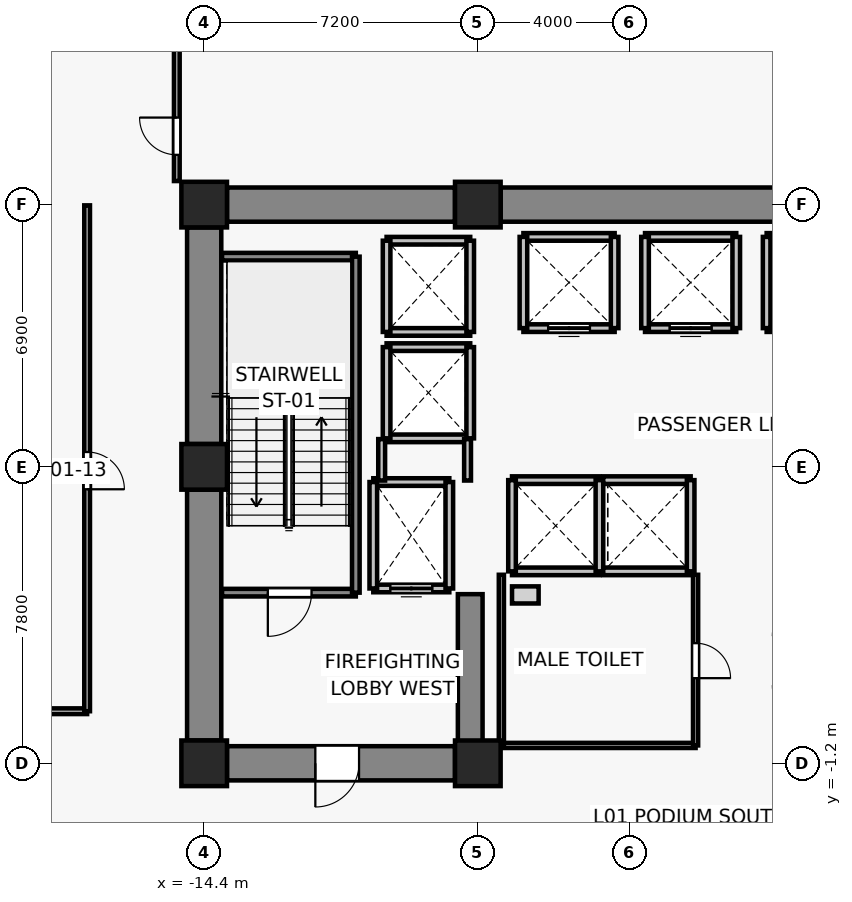
"""IFC4 building model, lengths in metres.
Left out: names, types, materials, properties, quantities, classifications, styles, units other than length and angle.
Written with IfcOpenShell. Run it as: python <this file> out.ifc"""

import sys

from ifc_helpers import new_model, si_unit, direction, frame, frame_2d, origin, origin_2d, place, context, subcontext, project, spatial, rectangle, extrude, source, transform, mapped, element, fill, save


model = new_model("IFC4")
c1 = context("Model", 3, precision=1e-05, world=origin(), true_north=direction((0.0, 1.0)))
c2 = subcontext(c1, "Body", "Model", "MODEL_VIEW")
j1 = project(units=[si_unit("LENGTHUNIT", "METRE"), si_unit("PLANEANGLEUNIT", "RADIAN")], contexts=[c1])
p1 = place(None, origin())
s1 = spatial("IfcSite", under=j1, at=p1, CompositionType="ELEMENT")
p2 = place(p1, origin())
s2 = spatial("IfcBuilding", under=s1, at=p2, CompositionType="ELEMENT")
p3 = place(p2, frame((0.0, 0.0, 5.0)))
s3 = spatial("IfcBuildingStorey", under=s2, at=p3, CompositionType="ELEMENT", Elevation=5.0)
for number, where, z_axis, x_axis in (
    (1, (-14.4, -1.2, 0.0), (0.0, 0.0, 1.0), (1.0, 0.0, 0.0)),
    (2, (-7.2, -1.2, 0.0), (0.0, 0.0, 1.0), (1.0, 0.0, 0.0)),
    (3, (-14.4, 6.6, 0.0), (0.0, 0.0, 1.0), (1.0, 0.0, 0.0)),
    (4, (-14.4, 13.5, 0.0), (0.0, 0.0, 1.0), (1.0, 0.0, 0.0)),
    (5, (-7.2, 13.5, 0.0), (0.0, 0.0, 1.0), (1.0, 0.0, 0.0)),
):
    element("IfcColumn", number, at=place(p3, frame(where, z_axis=z_axis, x_axis=x_axis)), inside=s3, PredefinedType="COLUMN", context=c2, shape_type="SweptSolid", body=[
        extrude(rectangle(XDim=1.2, YDim=1.2, at=origin_2d()), origin(), (0.0, 0.0, 1.0), 4.4),
    ])
p4 = place(p3, frame((-13.8, 13.5, 0.0), z_axis=(0.0, 0.0, 1.0), x_axis=(1.0, 0.0, 0.0)))
e6 = element("IfcWall", 6, at=p4, inside=s3, PredefinedType="SHEAR", context=c2, shape_type="SweptSolid", body=[
    extrude(rectangle(XDim=6.0, YDim=0.9, at=frame_2d((3.0, 0.0))), origin(), (0.0, 0.0, 1.0), 4.1),
])
p5 = place(p3, frame((-6.6, 13.5, 0.0), z_axis=(0.0, 0.0, 1.0), x_axis=(1.0, 0.0, 0.0)))
e7 = element("IfcWall", 7, at=p5, inside=s3, PredefinedType="SHEAR", context=c2, shape_type="SweptSolid", body=[
    extrude(rectangle(XDim=13.2, YDim=0.9, at=frame_2d((6.6, 0.0))), origin(), (0.0, 0.0, 1.0), 4.1),
])
p6 = place(p3, frame((-14.4, -0.6, 0.0), z_axis=(0.0, 0.0, 1.0), x_axis=(0.0, 1.0, 0.0)))
e8 = element("IfcWall", 8, at=p6, inside=s3, PredefinedType="SHEAR", context=c2, shape_type="SweptSolid", body=[
    extrude(rectangle(XDim=6.6, YDim=0.9, at=frame_2d((3.3, 0.0))), origin(), (0.0, 0.0, 1.0), 4.1),
])
p7 = place(p3, frame((-14.4, 7.2, 0.0), z_axis=(0.0, 0.0, 1.0), x_axis=(0.0, 1.0, 0.0)))
e9 = element("IfcWall", 9, at=p7, inside=s3, PredefinedType="SHEAR", context=c2, shape_type="SweptSolid", body=[
    extrude(rectangle(XDim=5.7, YDim=0.9, at=frame_2d((2.85, 0.0))), origin(), (0.0, 0.0, 1.0), 4.1),
])
p8 = place(p3, frame((-7.8, -1.2, 0.0), z_axis=(0.0, 0.0, 1.0), x_axis=(-1.0, 0.0, 0.0)))
e10 = element("IfcWall", 10, at=p8, inside=s3, PredefinedType="SHEAR", context=c2, shape_type="SweptSolid", body=[
    extrude(rectangle(XDim=6.0, YDim=0.9, at=frame_2d((3.0, 0.0))), origin(), (0.0, 0.0, 1.0), 4.1),
])
p9 = place(p8, frame((2.525, 0.0, 0.0)))
e11 = element("IfcOpeningElement", 11, at=p9, cuts=e10, PredefinedType="OPENING", context=c2, shape_type="SweptSolid", body=[
    extrude(rectangle(XDim=1.15, YDim=2.15, at=frame_2d((0.575, 1.075))), frame((0.0, 0.46, 0.0), z_axis=(0.0, -1.0, 0.0), x_axis=(1.0, 0.0, 0.0)), (0.0, 0.0, 1.0), 0.92),
])
p10 = place(p3, frame((-7.4, -0.75, 0.0), z_axis=(0.0, 0.0, 1.0), x_axis=(0.0, 1.0, 0.0)))
e12 = element("IfcWall", 12, at=p10, inside=s3, PredefinedType="SHEAR", context=c2, shape_type="SweptSolid", body=[
    extrude(rectangle(XDim=4.0, YDim=0.65, at=frame_2d((2.0, 0.0))), origin(), (0.0, 0.0, 1.0), 4.1),
])
p11 = place(p3, frame((-7.95, 3.4, 0.0), z_axis=(0.0, 0.0, 1.0), x_axis=(-1.0, 0.0, 0.0)))
e13 = element("IfcWall", 13, at=p11, inside=s3, PredefinedType="SOLIDWALL", context=c2, shape_type="SweptSolid", body=[
    extrude(rectangle(XDim=2.0, YDim=0.2, at=frame_2d((1.0, 0.0))), origin(), (0.0, 0.0, 1.0), 4.1),
])
p12 = place(p11, frame((0.45, 0.0, 0.0)))
e14 = element("IfcOpeningElement", 14, at=p12, cuts=e13, PredefinedType="OPENING", context=c2, shape_type="SweptSolid", body=[
    extrude(rectangle(XDim=1.1, YDim=2.2, at=frame_2d((0.55, 1.1))), frame((0.0, 0.11, 0.0), z_axis=(0.0, -1.0, 0.0), x_axis=(1.0, 0.0, 0.0)), (0.0, 0.0, 1.0), 0.22),
])
p13 = place(p3, frame((-9.95, 6.2, 0.0), z_axis=(0.0, 0.0, 1.0), x_axis=(1.0, 0.0, 0.0)))
e15 = element("IfcWall", 15, at=p13, inside=s3, PredefinedType="SOLIDWALL", context=c2, shape_type="SweptSolid", body=[
    extrude(rectangle(XDim=2.0, YDim=0.2, at=frame_2d((1.0, 0.0))), origin(), (0.0, 0.0, 1.0), 4.1),
])
for number, where, z_axis, x_axis in (
    (16, (-9.95, 3.4, 0.0), (0.0, 0.0, 1.0), (0.0, 1.0, 0.0)),
    (17, (-7.95, 6.2, 0.0), (0.0, 0.0, 1.0), (0.0, -1.0, 0.0)),
):
    element("IfcWall", number, at=place(p3, frame(where, z_axis=z_axis, x_axis=x_axis)), inside=s3, PredefinedType="SOLIDWALL", context=c2, shape_type="SweptSolid", body=[
        extrude(rectangle(XDim=2.8, YDim=0.2, at=frame_2d((1.4, 0.0))), origin(), (0.0, 0.0, 1.0), 4.1),
    ])
p14 = place(p3, frame((-3.6, 10.25, 0.0), z_axis=(0.0, 0.0, 1.0), x_axis=(-1.0, 0.0, 0.0)))
e18 = element("IfcWall", 18, at=p14, inside=s3, PredefinedType="SOLIDWALL", context=c2, shape_type="SweptSolid", body=[
    extrude(rectangle(XDim=2.4, YDim=0.2, at=frame_2d((1.2, 0.0))), origin(), (0.0, 0.0, 1.0), 4.1),
])
p15 = place(p14, frame((0.65, 0.0, 0.0)))
e19 = element("IfcOpeningElement", 19, at=p15, cuts=e18, PredefinedType="OPENING", context=c2, shape_type="SweptSolid", body=[
    extrude(rectangle(XDim=1.1, YDim=2.2, at=frame_2d((0.55, 1.1))), frame((0.0, 0.11, 0.0), z_axis=(0.0, -1.0, 0.0), x_axis=(1.0, 0.0, 0.0)), (0.0, 0.0, 1.0), 0.22),
])
for number, where, z_axis, x_axis in (
    (20, (-6.0, 12.65, 0.0), (0.0, 0.0, 1.0), (1.0, 0.0, 0.0)),
    (21, (-6.0, 10.25, 0.0), (0.0, 0.0, 1.0), (0.0, 1.0, 0.0)),
    (22, (-3.6, 12.65, 0.0), (0.0, 0.0, 1.0), (0.0, -1.0, 0.0)),
):
    element("IfcWall", number, at=place(p3, frame(where, z_axis=z_axis, x_axis=x_axis)), inside=s3, PredefinedType="SOLIDWALL", context=c2, shape_type="SweptSolid", body=[
        extrude(rectangle(XDim=2.4, YDim=0.2, at=frame_2d((1.2, 0.0))), origin(), (0.0, 0.0, 1.0), 4.1),
    ])
p16 = place(p3, frame((-0.4, 10.25, 0.0), z_axis=(0.0, 0.0, 1.0), x_axis=(-1.0, 0.0, 0.0)))
e23 = element("IfcWall", 23, at=p16, inside=s3, PredefinedType="SOLIDWALL", context=c2, shape_type="SweptSolid", body=[
    extrude(rectangle(XDim=2.4, YDim=0.2, at=frame_2d((1.2, 0.0))), origin(), (0.0, 0.0, 1.0), 4.1),
])
p17 = place(p16, frame((0.65, 0.0, 0.0)))
e24 = element("IfcOpeningElement", 24, at=p17, cuts=e23, PredefinedType="OPENING", context=c2, shape_type="SweptSolid", body=[
    extrude(rectangle(XDim=1.1, YDim=2.2, at=frame_2d((0.55, 1.1))), frame((0.0, 0.11, 0.0), z_axis=(0.0, -1.0, 0.0), x_axis=(1.0, 0.0, 0.0)), (0.0, 0.0, 1.0), 0.22),
])
p18 = place(p3, frame((-2.8, 12.65, 0.0), z_axis=(0.0, 0.0, 1.0), x_axis=(1.0, 0.0, 0.0)))
e25 = element("IfcWall", 25, at=p18, inside=s3, PredefinedType="SOLIDWALL", context=c2, shape_type="SweptSolid", body=[
    extrude(rectangle(XDim=2.4, YDim=0.2, at=frame_2d((1.2, 0.0))), origin(), (0.0, 0.0, 1.0), 4.1),
])
for number, where, z_axis, x_axis in (
    (26, (-2.8, 10.25, 0.0), (0.0, 0.0, 1.0), (0.0, 1.0, 0.0)),
    (27, (-0.4, 12.65, 0.0), (0.0, 0.0, 1.0), (0.0, -1.0, 0.0)),
):
    element("IfcWall", number, at=place(p3, frame(where, z_axis=z_axis, x_axis=x_axis)), inside=s3, PredefinedType="SOLIDWALL", context=c2, shape_type="SweptSolid", body=[
        extrude(rectangle(XDim=2.4, YDim=0.2, at=frame_2d((1.2, 0.0))), origin(), (0.0, 0.0, 1.0), 4.1),
    ])
p19 = place(p3, frame((2.8, 10.25, 0.0), z_axis=(0.0, 0.0, 1.0), x_axis=(-1.0, 0.0, 0.0)))
e28 = element("IfcWall", 28, at=p19, inside=s3, PredefinedType="SOLIDWALL", context=c2, shape_type="SweptSolid", body=[
    extrude(rectangle(XDim=2.4, YDim=0.2, at=frame_2d((1.2, 0.0))), origin(), (0.0, 0.0, 1.0), 4.1),
])
p20 = place(p19, frame((0.65, 0.0, 0.0)))
e29 = element("IfcOpeningElement", 29, at=p20, cuts=e28, PredefinedType="OPENING", context=c2, shape_type="SweptSolid", body=[
    extrude(rectangle(XDim=1.1, YDim=2.2, at=frame_2d((0.55, 1.1))), frame((0.0, 0.11, 0.0), z_axis=(0.0, -1.0, 0.0), x_axis=(1.0, 0.0, 0.0)), (0.0, 0.0, 1.0), 0.22),
])
p21 = place(p3, frame((0.4, 12.65, 0.0), z_axis=(0.0, 0.0, 1.0), x_axis=(1.0, 0.0, 0.0)))
e30 = element("IfcWall", 30, at=p21, inside=s3, PredefinedType="SOLIDWALL", context=c2, shape_type="SweptSolid", body=[
    extrude(rectangle(XDim=2.4, YDim=0.2, at=frame_2d((1.2, 0.0))), origin(), (0.0, 0.0, 1.0), 4.1),
])
p22 = place(p3, frame((0.4, 10.25, 0.0), z_axis=(0.0, 0.0, 1.0), x_axis=(0.0, 1.0, 0.0)))
e31 = element("IfcWall", 31, at=p22, inside=s3, PredefinedType="SOLIDWALL", context=c2, shape_type="SweptSolid", body=[
    extrude(rectangle(XDim=2.4, YDim=0.2, at=frame_2d((1.2, 0.0))), origin(), (0.0, 0.0, 1.0), 4.1),
])
for number, where, z_axis, x_axis in (
    (32, (-4.0, 3.85, 0.0), (0.0, 0.0, 1.0), (-1.0, 0.0, 0.0)),
    (33, (-6.3, 6.25, 0.0), (0.0, 0.0, 1.0), (1.0, 0.0, 0.0)),
):
    element("IfcWall", number, at=place(p3, frame(where, z_axis=z_axis, x_axis=x_axis)), inside=s3, PredefinedType="SOLIDWALL", context=c2, shape_type="SweptSolid", body=[
        extrude(rectangle(XDim=2.3, YDim=0.2, at=frame_2d((1.15, 0.0))), origin(), (0.0, 0.0, 1.0), 4.1),
    ])
for number, where, z_axis, x_axis in (
    (34, (-6.3, 3.85, 0.0), (0.0, 0.0, 1.0), (0.0, 1.0, 0.0)),
    (35, (-4.0, 6.25, 0.0), (0.0, 0.0, 1.0), (0.0, -1.0, 0.0)),
):
    element("IfcWall", number, at=place(p3, frame(where, z_axis=z_axis, x_axis=x_axis)), inside=s3, PredefinedType="SOLIDWALL", context=c2, shape_type="SweptSolid", body=[
        extrude(rectangle(XDim=2.4, YDim=0.2, at=frame_2d((1.2, 0.0))), origin(), (0.0, 0.0, 1.0), 4.1),
    ])
for number, where, z_axis, x_axis in (
    (36, (-1.6, 3.85, 0.0), (0.0, 0.0, 1.0), (-1.0, 0.0, 0.0)),
    (37, (-3.9, 6.25, 0.0), (0.0, 0.0, 1.0), (1.0, 0.0, 0.0)),
):
    element("IfcWall", number, at=place(p3, frame(where, z_axis=z_axis, x_axis=x_axis)), inside=s3, PredefinedType="SOLIDWALL", context=c2, shape_type="SweptSolid", body=[
        extrude(rectangle(XDim=2.3, YDim=0.2, at=frame_2d((1.15, 0.0))), origin(), (0.0, 0.0, 1.0), 4.1),
    ])
p23 = place(p3, frame((-1.6, 6.25, 0.0), z_axis=(0.0, 0.0, 1.0), x_axis=(0.0, -1.0, 0.0)))
e38 = element("IfcWall", 38, at=p23, inside=s3, PredefinedType="SOLIDWALL", context=c2, shape_type="SweptSolid", body=[
    extrude(rectangle(XDim=2.4, YDim=0.2, at=frame_2d((1.2, 0.0))), origin(), (0.0, 0.0, 1.0), 4.1),
])
for number, where, z_axis, x_axis in (
    (39, (-7.4, 7.35, 0.0), (0.0, 0.0, 1.0), (-1.0, 0.0, 0.0)),
    (40, (-9.6, 9.75, 0.0), (0.0, 0.0, 1.0), (1.0, 0.0, 0.0)),
):
    element("IfcWall", number, at=place(p3, frame(where, z_axis=z_axis, x_axis=x_axis)), inside=s3, PredefinedType="SOLIDWALL", context=c2, shape_type="SweptSolid", body=[
        extrude(rectangle(XDim=2.2, YDim=0.2, at=frame_2d((1.1, 0.0))), origin(), (0.0, 0.0, 1.0), 3.19),
    ])
p24 = place(p3, frame((-9.6, 7.35, 0.0), z_axis=(0.0, 0.0, 1.0), x_axis=(0.0, 1.0, 0.0)))
e41 = element("IfcWall", 41, at=p24, inside=s3, PredefinedType="SOLIDWALL", context=c2, shape_type="SweptSolid", body=[
    extrude(rectangle(XDim=2.4, YDim=0.2, at=frame_2d((1.2, 0.0))), origin(), (0.0, 0.0, 1.0), 4.1),
])
p25 = place(p3, frame((-7.4, 9.75, 0.0), z_axis=(0.0, 0.0, 1.0), x_axis=(0.0, -1.0, 0.0)))
e42 = element("IfcWall", 42, at=p25, inside=s3, PredefinedType="SOLIDWALL", context=c2, shape_type="SweptSolid", body=[
    extrude(rectangle(XDim=2.4, YDim=0.2, at=frame_2d((1.2, 0.0))), origin(), (0.0, 0.0, 1.0), 3.19),
])
for number, where, z_axis, x_axis in (
    (43, (-7.4, 10.15, 0.0), (0.0, 0.0, 1.0), (-1.0, 0.0, 0.0)),
    (44, (-9.6, 12.55, 0.0), (0.0, 0.0, 1.0), (1.0, 0.0, 0.0)),
):
    element("IfcWall", number, at=place(p3, frame(where, z_axis=z_axis, x_axis=x_axis)), inside=s3, PredefinedType="SOLIDWALL", context=c2, shape_type="SweptSolid", body=[
        extrude(rectangle(XDim=2.2, YDim=0.2, at=frame_2d((1.1, 0.0))), origin(), (0.0, 0.0, 1.0), 3.19),
    ])
p26 = place(p3, frame((-9.6, 10.15, 0.0), z_axis=(0.0, 0.0, 1.0), x_axis=(0.0, 1.0, 0.0)))
e45 = element("IfcWall", 45, at=p26, inside=s3, PredefinedType="SOLIDWALL", context=c2, shape_type="SweptSolid", body=[
    extrude(rectangle(XDim=2.4, YDim=0.2, at=frame_2d((1.2, 0.0))), origin(), (0.0, 0.0, 1.0), 4.1),
])
p27 = place(p3, frame((-7.4, 12.55, 0.0), z_axis=(0.0, 0.0, 1.0), x_axis=(0.0, -1.0, 0.0)))
e46 = element("IfcWall", 46, at=p27, inside=s3, PredefinedType="SOLIDWALL", context=c2, shape_type="SweptSolid", body=[
    extrude(rectangle(XDim=2.4, YDim=0.2, at=frame_2d((1.2, 0.0))), origin(), (0.0, 0.0, 1.0), 3.19),
])
p28 = place(p3, frame((-10.41, 3.29, 0.0), z_axis=(0.0, 0.0, 1.0), x_axis=(-1.0, 0.0, 0.0)))
e47 = element("IfcWall", 47, at=p28, inside=s3, PredefinedType="SOLIDWALL", context=c2, shape_type="SweptSolid", body=[
    extrude(rectangle(XDim=3.52, YDim=0.2, at=frame_2d((1.76, 0.0))), origin(), (0.0, 0.0, 1.0), 4.1),
])
p29 = place(p28, frame((1.165, 0.0, 0.0)))
e48 = element("IfcOpeningElement", 48, at=p29, cuts=e47, PredefinedType="OPENING", context=c2, shape_type="SweptSolid", body=[
    extrude(rectangle(XDim=1.15, YDim=2.15, at=frame_2d((0.575, 1.075))), frame((0.0, 0.11, 0.0), z_axis=(0.0, -1.0, 0.0), x_axis=(1.0, 0.0, 0.0)), (0.0, 0.0, 1.0), 0.22),
])
p30 = place(p3, frame((-13.93, 12.13, 0.0), z_axis=(0.0, 0.0, 1.0), x_axis=(1.0, 0.0, 0.0)))
e49 = element("IfcWall", 49, at=p30, inside=s3, PredefinedType="SOLIDWALL", context=c2, shape_type="SweptSolid", body=[
    extrude(rectangle(XDim=3.52, YDim=0.2, at=frame_2d((1.76, 0.0))), origin(), (0.0, 0.0, 1.0), 4.1),
])
p31 = place(p3, frame((-10.41, 12.13, 0.0), z_axis=(0.0, 0.0, 1.0), x_axis=(0.0, -1.0, 0.0)))
e50 = element("IfcWall", 50, at=p31, inside=s3, PredefinedType="SOLIDWALL", context=c2, shape_type="SweptSolid", body=[
    extrude(rectangle(XDim=8.84, YDim=0.2, at=frame_2d((4.42, 0.0))), origin(), (0.0, 0.0, 1.0), 4.1),
])
p32 = place(p3, frame((-9.73, 6.24, 0.0), z_axis=(0.0, 0.0, 1.0), x_axis=(0.0, 1.0, 0.0)))
e51 = element("IfcWall", 51, at=p32, inside=s3, PredefinedType="PARTITIONING", context=c2, shape_type="SweptSolid", body=[
    extrude(rectangle(XDim=1.09, YDim=0.18, at=frame_2d((0.545, 0.0))), origin(), (0.0, 0.0, 1.0), 4.1),
])
p33 = place(p3, frame((-7.47, 7.33, 0.0), z_axis=(0.0, 0.0, 1.0), x_axis=(0.0, -1.0, 0.0)))
e52 = element("IfcWall", 52, at=p33, inside=s3, PredefinedType="PARTITIONING", context=c2, shape_type="SweptSolid", body=[
    extrude(rectangle(XDim=1.09, YDim=0.18, at=frame_2d((0.545, 0.0))), origin(), (0.0, 0.0, 1.0), 3.19),
])
p34 = place(p3, frame((-1.47, -0.73, 0.0), z_axis=(0.0, 0.0, 1.0), x_axis=(-1.0, 0.0, 0.0)))
e53 = element("IfcWall", 53, at=p34, inside=s3, PredefinedType="PARTITIONING", context=c2, shape_type="SweptSolid", body=[
    extrude(rectangle(XDim=5.11, YDim=0.135, at=frame_2d((2.555, 0.0))), origin(), (0.0, 0.0, 1.0), 4.1),
])
p35 = place(p3, frame((-6.58, -0.73, 0.0), z_axis=(0.0, 0.0, 1.0), x_axis=(0.0, 1.0, 0.0)))
e54 = element("IfcWall", 54, at=p35, inside=s3, PredefinedType="PARTITIONING", context=c2, shape_type="SweptSolid", body=[
    extrude(rectangle(XDim=4.49, YDim=0.135, at=frame_2d((2.245, 0.0))), origin(), (0.0, 0.0, 1.0), 3.473),
])
p36 = place(p3, frame((-1.47, 3.76, 0.0), z_axis=(0.0, 0.0, 1.0), x_axis=(0.0, -1.0, 0.0)))
e55 = element("IfcWall", 55, at=p36, inside=s3, PredefinedType="PARTITIONING", context=c2, shape_type="SweptSolid", body=[
    extrude(rectangle(XDim=4.49, YDim=0.135, at=frame_2d((2.245, 0.0))), origin(), (0.0, 0.0, 1.0), 3.473),
])
p37 = place(p36, frame((1.8, 0.0, 0.0)))
e56 = element("IfcOpeningElement", 56, at=p37, cuts=e55, PredefinedType="OPENING", context=c2, shape_type="SweptSolid", body=[
    extrude(rectangle(XDim=0.92, YDim=2.1, at=frame_2d((0.46, 1.05))), frame((0.0, 0.077, 0.0), z_axis=(0.0, -1.0, 0.0), x_axis=(1.0, 0.0, 0.0)), (0.0, 0.0, 1.0), 0.155),
])
p38 = place(p3, frame((-17.48, 0.17, 0.0), z_axis=(0.0, 0.0, 1.0), x_axis=(-1.0, 0.0, 0.0)))
e57 = element("IfcWall", 57, at=p38, inside=s3, PredefinedType="PARTITIONING", context=c2, shape_type="SweptSolid", body=[
    extrude(rectangle(XDim=7.31, YDim=0.15, at=frame_2d((3.655, 0.0))), origin(), (0.0, 0.0, 1.0), 3.19),
])
p39 = place(p3, frame((-17.48, 13.48, 0.0), z_axis=(0.0, 0.0, 1.0), x_axis=(0.0, -1.0, 0.0)))
e58 = element("IfcWall", 58, at=p39, inside=s3, PredefinedType="PARTITIONING", context=c2, shape_type="SweptSolid", body=[
    extrude(rectangle(XDim=13.31, YDim=0.15, at=frame_2d((6.655, 0.0))), origin(), (0.0, 0.0, 1.0), 3.19),
])
p40 = place(p39, frame((6.49, 0.0, 0.0)))
e59 = element("IfcOpeningElement", 59, at=p40, cuts=e58, PredefinedType="OPENING", context=c2, shape_type="SweptSolid", body=[
    extrude(rectangle(XDim=0.98, YDim=2.15, at=frame_2d((0.49, 1.075))), frame((0.0, 0.085, 0.0), z_axis=(0.0, -1.0, 0.0), x_axis=(1.0, 0.0, 0.0)), (0.0, 0.0, 1.0), 0.17),
])
p41 = place(p3, frame((-15.12, 14.12, 0.0), z_axis=(0.0, 0.0, 1.0), x_axis=(0.0, 1.0, 0.0)))
e60 = element("IfcWall", 60, at=p41, inside=s3, PredefinedType="PARTITIONING", context=c2, shape_type="SweptSolid", body=[
    extrude(rectangle(XDim=8.76, YDim=0.15, at=frame_2d((4.38, 0.0))), origin(), (0.0, 0.0, 1.0), 3.19),
])
p42 = place(p41, frame((0.69, 0.0, 0.0)))
e61 = element("IfcOpeningElement", 61, at=p42, cuts=e60, PredefinedType="OPENING", context=c2, shape_type="SweptSolid", body=[
    extrude(rectangle(XDim=0.98, YDim=2.15, at=frame_2d((0.49, 1.075))), frame((0.0, 0.085, 0.0), z_axis=(0.0, -1.0, 0.0), x_axis=(1.0, 0.0, 0.0)), (0.0, 0.0, 1.0), 0.17),
])
m1 = source(origin(), c2, "Body", "SweptSolid", [
    extrude(rectangle(XDim=1.1, YDim=2.2, at=frame_2d((0.55, 1.1))), frame((0.0, 0.025, 0.0), z_axis=(0.0, -1.0, 0.0), x_axis=(1.0, 0.0, 0.0)), (0.0, 0.0, 1.0), 0.05),
])
p43 = place(p12, origin())
e62 = element("IfcDoor", 62, at=p43, inside=s3, OperationType="DOUBLE_DOOR_SLIDING", PredefinedType="DOOR", context=c2, shape_type="MappedRepresentation", body=[
    mapped(m1, transform((0.0, 0.0, 0.0), x_axis=(1.0, 0.0, 0.0), y_axis=(0.0, 1.0, 0.0), z_axis=(0.0, 0.0, 1.0), scale=1.0)),
])
fill(e14, e62)
p44 = place(p15, origin())
e63 = element("IfcDoor", 63, at=p44, inside=s3, OperationType="DOUBLE_DOOR_SLIDING", PredefinedType="DOOR", context=c2, shape_type="MappedRepresentation", body=[
    mapped(m1, transform((0.0, 0.0, 0.0), x_axis=(1.0, 0.0, 0.0), y_axis=(0.0, 1.0, 0.0), z_axis=(0.0, 0.0, 1.0), scale=1.0)),
])
fill(e19, e63)
p45 = place(p17, origin())
e64 = element("IfcDoor", 64, at=p45, inside=s3, OperationType="DOUBLE_DOOR_SLIDING", PredefinedType="DOOR", context=c2, shape_type="MappedRepresentation", body=[
    mapped(m1, transform((0.0, 0.0, 0.0), x_axis=(1.0, 0.0, 0.0), y_axis=(0.0, 1.0, 0.0), z_axis=(0.0, 0.0, 1.0), scale=1.0)),
])
fill(e24, e64)
m2 = source(origin(), c2, "Body", "SweptSolid", [
    extrude(rectangle(XDim=1.15, YDim=2.15, at=frame_2d((0.575, 1.075))), frame((0.0, 0.025, 0.0), z_axis=(0.0, -1.0, 0.0), x_axis=(1.0, 0.0, 0.0)), (0.0, 0.0, 1.0), 0.05),
])
p46 = place(p29, origin())
e65 = element("IfcDoor", 65, at=p46, inside=s3, OperationType="SINGLE_SWING_RIGHT", PredefinedType="DOOR", context=c2, shape_type="MappedRepresentation", body=[
    mapped(m2, transform((0.0, 0.0, 0.0), x_axis=(1.0, 0.0, 0.0), y_axis=(0.0, 1.0, 0.0), z_axis=(0.0, 0.0, 1.0), scale=1.0)),
])
fill(e48, e65)
p47 = place(p9, origin())
e66 = element("IfcDoor", 66, at=p47, inside=s3, OperationType="SINGLE_SWING_RIGHT", PredefinedType="DOOR", context=c2, shape_type="MappedRepresentation", body=[
    mapped(m2, transform((0.0, 0.0, 0.0), x_axis=(1.0, 0.0, 0.0), y_axis=(0.0, 1.0, 0.0), z_axis=(0.0, 0.0, 1.0), scale=1.0)),
])
fill(e11, e66)
m3 = source(origin(), c2, "Body", "SweptSolid", [
    extrude(rectangle(XDim=0.92, YDim=2.1, at=frame_2d((0.46, 1.05))), frame((0.0, 0.025, 0.0), z_axis=(0.0, -1.0, 0.0), x_axis=(1.0, 0.0, 0.0)), (0.0, 0.0, 1.0), 0.05),
])
p48 = place(p37, origin())
e67 = element("IfcDoor", 67, at=p48, inside=s3, OperationType="SINGLE_SWING_RIGHT", PredefinedType="DOOR", context=c2, shape_type="MappedRepresentation", body=[
    mapped(m3, transform((0.0, 0.0, 0.0), x_axis=(1.0, 0.0, 0.0), y_axis=(0.0, 1.0, 0.0), z_axis=(0.0, 0.0, 1.0), scale=1.0)),
])
fill(e56, e67)
m4 = source(origin(), c2, "Body", "SweptSolid", [
    extrude(rectangle(XDim=0.98, YDim=2.15, at=frame_2d((0.49, 1.075))), frame((0.0, 0.025, 0.0), z_axis=(0.0, -1.0, 0.0), x_axis=(1.0, 0.0, 0.0)), (0.0, 0.0, 1.0), 0.05),
])
p49 = place(p40, origin())
e68 = element("IfcDoor", 68, at=p49, inside=s3, OperationType="SINGLE_SWING_RIGHT", PredefinedType="DOOR", context=c2, shape_type="MappedRepresentation", body=[
    mapped(m4, transform((0.0, 0.0, 0.0), x_axis=(1.0, 0.0, 0.0), y_axis=(0.0, 1.0, 0.0), z_axis=(0.0, 0.0, 1.0), scale=1.0)),
])
fill(e59, e68)
p50 = place(p42, origin())
e69 = element("IfcDoor", 69, at=p50, inside=s3, OperationType="SINGLE_SWING_RIGHT", PredefinedType="DOOR", context=c2, shape_type="MappedRepresentation", body=[
    mapped(m4, transform((0.0, 0.0, 0.0), x_axis=(1.0, 0.0, 0.0), y_axis=(0.0, 1.0, 0.0), z_axis=(0.0, 0.0, 1.0), scale=1.0)),
])
fill(e61, e69)
save(model, sys.argv[1])
